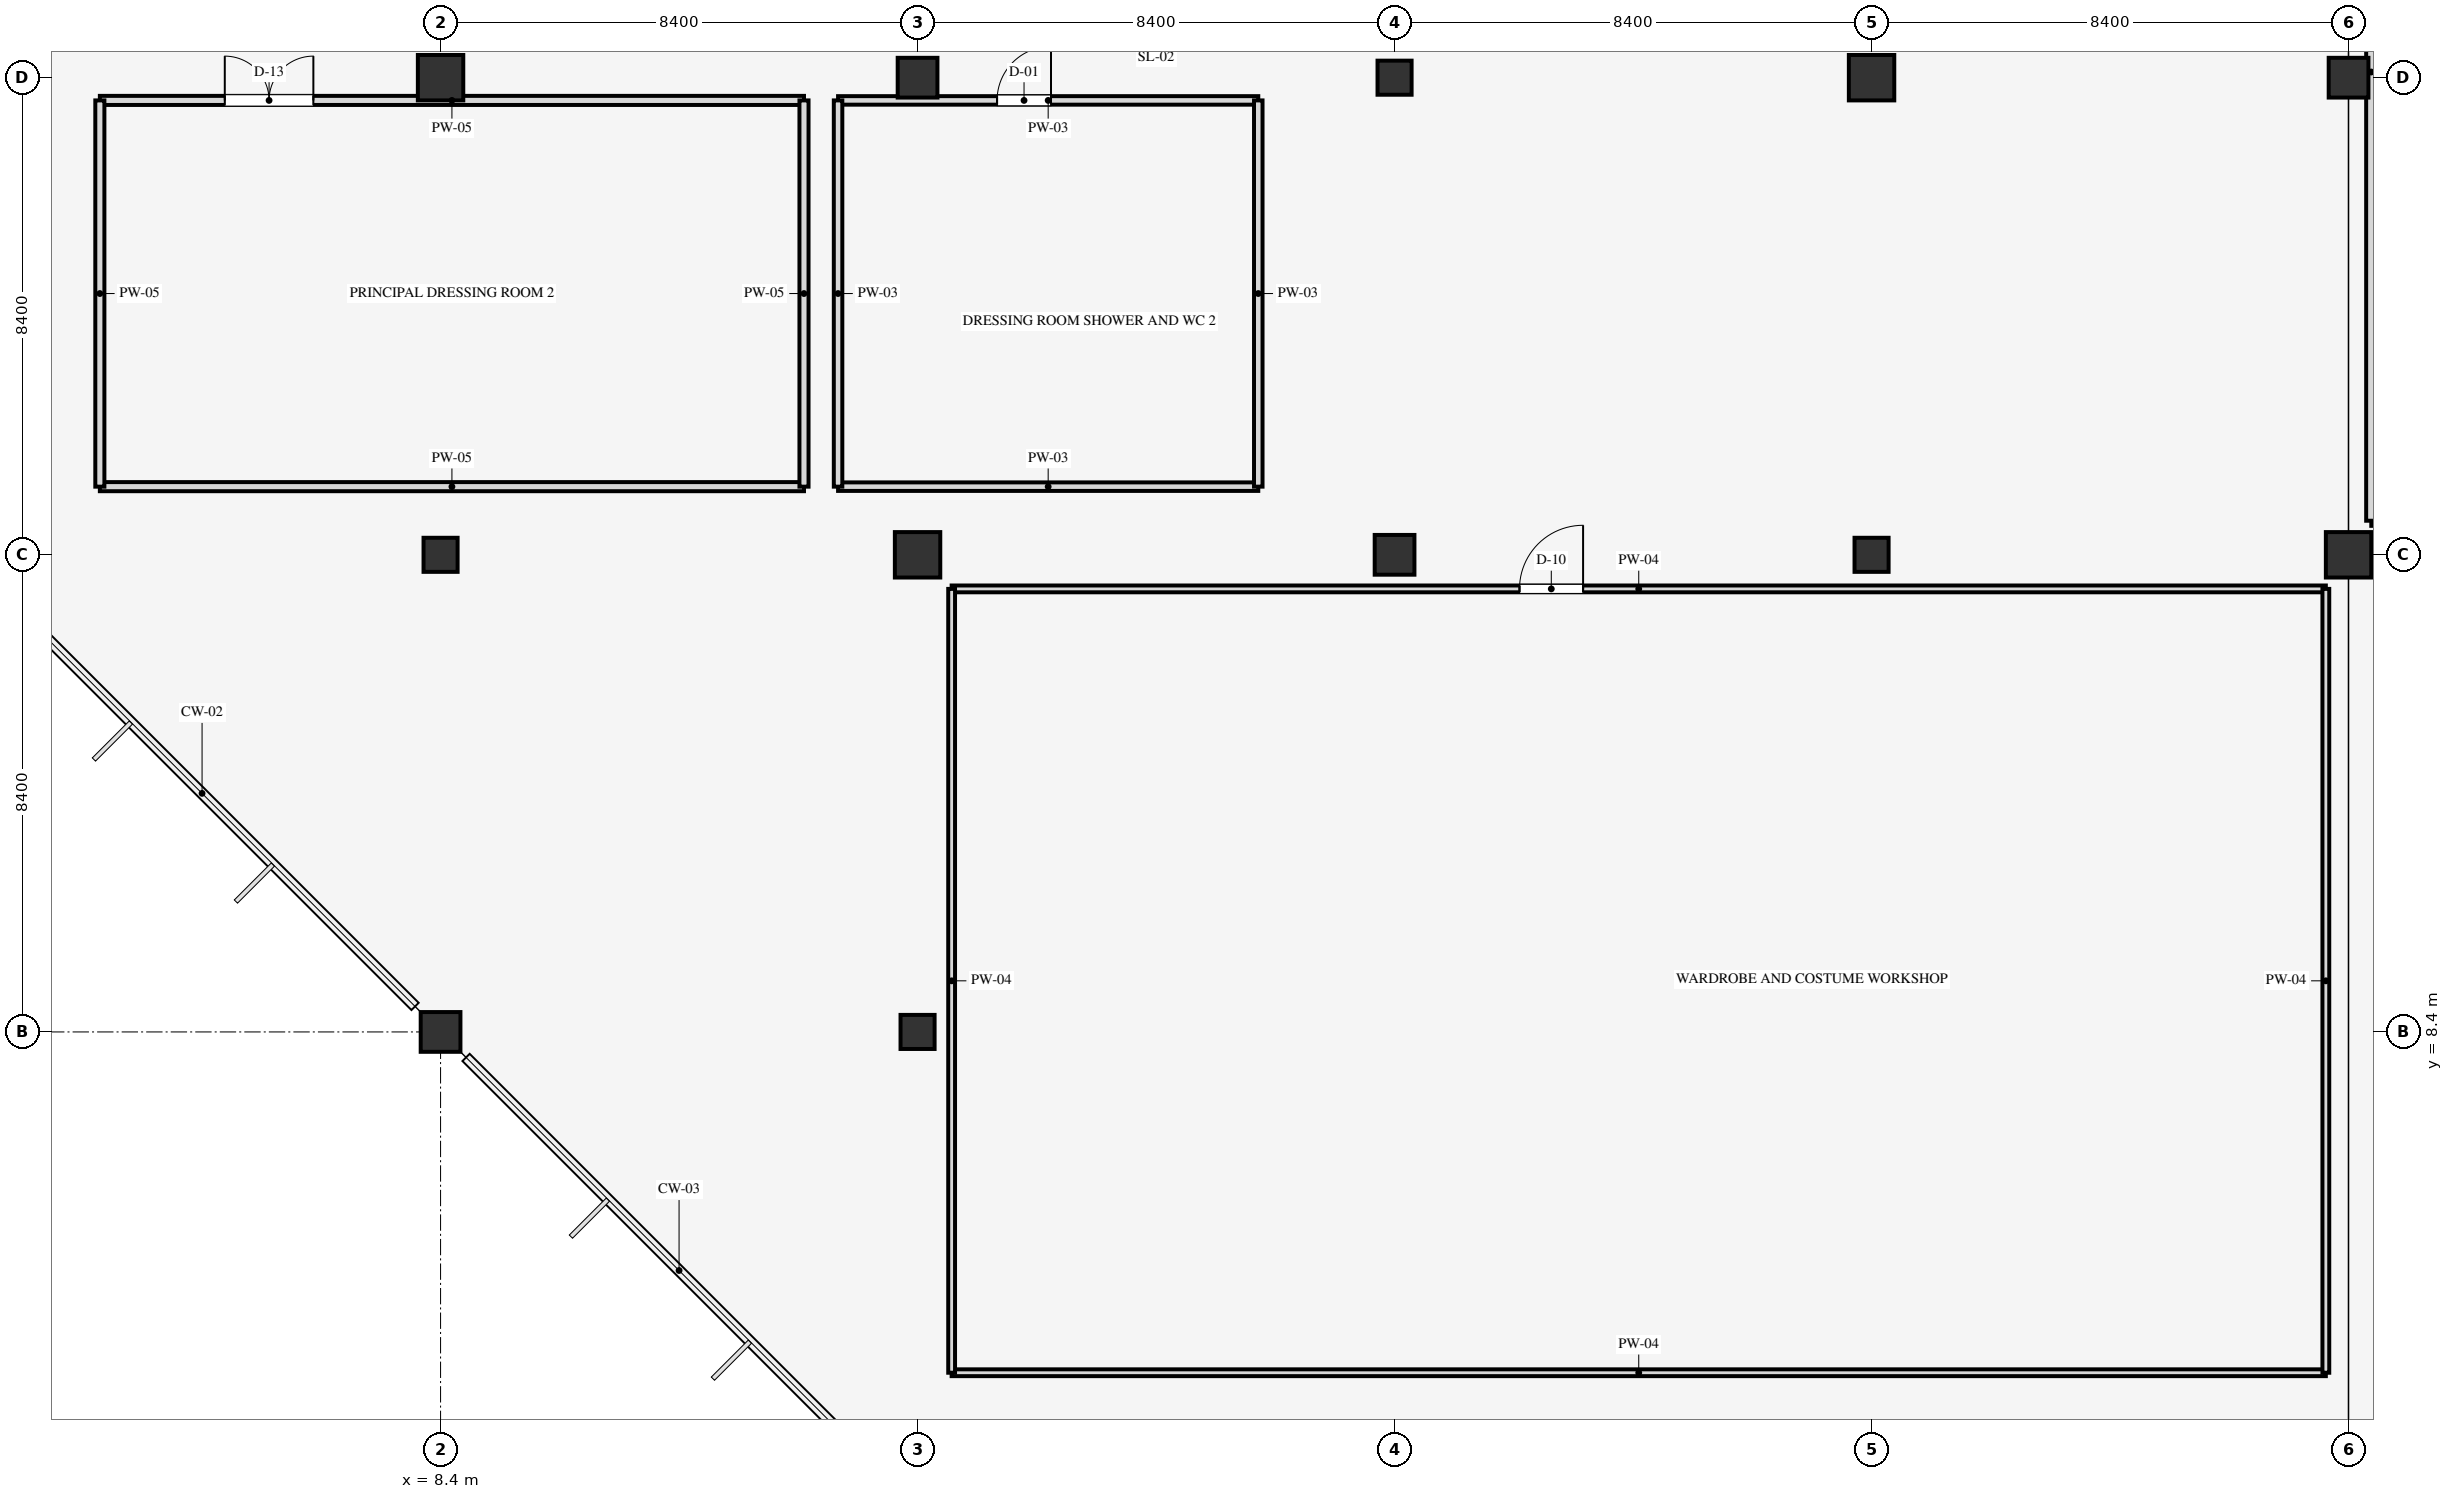
"""IFC4 building model, lengths in metres.
Left out: names, types, materials, properties, quantities, classifications, styles, units other than length and angle.
Written with IfcOpenShell. Run it as: python <this file> out.ifc"""

import sys

from ifc_helpers import new_model, si_unit, direction, frame, frame_2d, origin, origin_2d, place, context, subcontext, project, spatial, rectangle, extrude, element, fill, save


model = new_model("IFC4")
c1 = context("Model", 3, precision=1e-05, world=origin(), true_north=direction((0.0, 1.0)))
c2 = subcontext(c1, "Body", "Model", "MODEL_VIEW")
j1 = project(units=[si_unit("LENGTHUNIT", "METRE"), si_unit("PLANEANGLEUNIT", "RADIAN")], contexts=[c1])
p1 = place(None, origin())
s1 = spatial("IfcSite", under=j1, at=p1, CompositionType="ELEMENT")
p2 = place(p1, origin())
s2 = spatial("IfcBuilding", under=s1, at=p2, CompositionType="ELEMENT")
p3 = place(p2, frame((0.0, 0.0, 5.4)))
s3 = spatial("IfcBuildingStorey", under=s2, at=p3, CompositionType="ELEMENT", Elevation=5.4)
p4 = place(p3, frame((8.4, 8.4, 0.0), z_axis=(0.0, 0.0, 1.0), x_axis=(1.0, 0.0, 0.0)))
e1 = element("IfcColumn", 1, at=p4, inside=s3, PredefinedType="COLUMN", context=c2, shape_type="SweptSolid", body=[
    extrude(rectangle(XDim=0.7, YDim=0.7, at=origin_2d()), origin(), (0.0, 0.0, 1.0), 4.5),
])
p5 = place(p3, frame((8.4, 16.8, 0.0), z_axis=(0.0, 0.0, 1.0), x_axis=(1.0, 0.0, 0.0)))
e2 = element("IfcColumn", 2, at=p5, inside=s3, PredefinedType="COLUMN", context=c2, shape_type="SweptSolid", body=[
    extrude(rectangle(XDim=0.6, YDim=0.6, at=origin_2d()), origin(), (0.0, 0.0, 1.0), 4.5),
])
p6 = place(p3, frame((8.4, 25.2, 0.0), z_axis=(0.0, 0.0, 1.0), x_axis=(1.0, 0.0, 0.0)))
e3 = element("IfcColumn", 3, at=p6, inside=s3, PredefinedType="COLUMN", context=c2, shape_type="SweptSolid", body=[
    extrude(rectangle(XDim=0.8, YDim=0.8, at=origin_2d()), origin(), (0.0, 0.0, 1.0), 4.5),
])
p7 = place(p3, frame((16.8, 8.4, 0.0), z_axis=(0.0, 0.0, 1.0), x_axis=(1.0, 0.0, 0.0)))
e4 = element("IfcColumn", 4, at=p7, inside=s3, PredefinedType="COLUMN", context=c2, shape_type="SweptSolid", body=[
    extrude(rectangle(XDim=0.6, YDim=0.6, at=origin_2d()), origin(), (0.0, 0.0, 1.0), 4.5),
])
p8 = place(p3, frame((16.8, 16.8, 0.0), z_axis=(0.0, 0.0, 1.0), x_axis=(1.0, 0.0, 0.0)))
e5 = element("IfcColumn", 5, at=p8, inside=s3, PredefinedType="COLUMN", context=c2, shape_type="SweptSolid", body=[
    extrude(rectangle(XDim=0.8, YDim=0.8, at=origin_2d()), origin(), (0.0, 0.0, 1.0), 4.5),
])
for number, where, z_axis, x_axis in (
    (6, (16.8, 25.2, 0.0), (0.0, 0.0, 1.0), (1.0, 0.0, 0.0)),
    (7, (25.2, 16.8, 0.0), (0.0, 0.0, 1.0), (1.0, 0.0, 0.0)),
):
    element("IfcColumn", number, at=place(p3, frame(where, z_axis=z_axis, x_axis=x_axis)), inside=s3, PredefinedType="COLUMN", context=c2, shape_type="SweptSolid", body=[
        extrude(rectangle(XDim=0.7, YDim=0.7, at=origin_2d()), origin(), (0.0, 0.0, 1.0), 4.5),
    ])
for number, where, z_axis, x_axis in (
    (8, (25.2, 25.2, 0.0), (0.0, 0.0, 1.0), (1.0, 0.0, 0.0)),
    (9, (33.6, 16.8, 0.0), (0.0, 0.0, 1.0), (1.0, 0.0, 0.0)),
):
    element("IfcColumn", number, at=place(p3, frame(where, z_axis=z_axis, x_axis=x_axis)), inside=s3, PredefinedType="COLUMN", context=c2, shape_type="SweptSolid", body=[
        extrude(rectangle(XDim=0.6, YDim=0.6, at=origin_2d()), origin(), (0.0, 0.0, 1.0), 4.5),
    ])
for number, where, z_axis, x_axis in (
    (10, (33.6, 25.2, 0.0), (0.0, 0.0, 1.0), (1.0, 0.0, 0.0)),
    (11, (42.0, 16.8, 0.0), (0.0, 0.0, 1.0), (1.0, 0.0, 0.0)),
):
    element("IfcColumn", number, at=place(p3, frame(where, z_axis=z_axis, x_axis=x_axis)), inside=s3, PredefinedType="COLUMN", context=c2, shape_type="SweptSolid", body=[
        extrude(rectangle(XDim=0.8, YDim=0.8, at=origin_2d()), origin(), (0.0, 0.0, 1.0), 4.5),
    ])
p9 = place(p3, frame((42.0, 25.2, 0.0), z_axis=(0.0, 0.0, 1.0), x_axis=(1.0, 0.0, 0.0)))
e12 = element("IfcColumn", 12, at=p9, inside=s3, PredefinedType="COLUMN", context=c2, shape_type="SweptSolid", body=[
    extrude(rectangle(XDim=0.7, YDim=0.7, at=origin_2d()), origin(), (0.0, 0.0, 1.0), 4.5),
])
p10 = place(p3, frame((2.4, 18.0, 0.0), z_axis=(0.0, 0.0, 1.0), x_axis=(1.0, 0.0, 0.0)))
e13 = element("IfcWall", 13, at=p10, inside=s3, PredefinedType="PARTITIONING", context=c2, shape_type="SweptSolid", body=[
    extrude(rectangle(XDim=12.4, YDim=0.16, at=frame_2d((6.2, 0.0))), origin(), (0.0, 0.0, 1.0), 3.54),
])
p11 = place(p3, frame((2.4, 24.8, 0.0), z_axis=(0.0, 0.0, 1.0), x_axis=(1.0, 0.0, 0.0)))
e14 = element("IfcWall", 14, at=p11, inside=s3, PredefinedType="PARTITIONING", context=c2, shape_type="SweptSolid", body=[
    extrude(rectangle(XDim=12.4, YDim=0.16, at=frame_2d((6.2, 0.0))), origin(), (0.0, 0.0, 1.0), 3.54),
])
p12 = place(p11, frame((2.2, 0.0, 0.0)))
e15 = element("IfcOpeningElement", 15, at=p12, cuts=e14, PredefinedType="OPENING", context=c2, shape_type="SweptSolid", body=[
    extrude(rectangle(XDim=1.56, YDim=2.2, at=frame_2d((0.78, 1.1))), frame((0.0, 0.09, 0.0), z_axis=(0.0, -1.0, 0.0), x_axis=(1.0, 0.0, 0.0)), (0.0, 0.0, 1.0), 0.18),
])
for number, where, z_axis, x_axis in (
    (16, (2.4, 18.0, 0.0), (0.0, 0.0, 1.0), (0.0, 1.0, 0.0)),
    (17, (14.8, 18.0, 0.0), (0.0, 0.0, 1.0), (0.0, 1.0, 0.0)),
):
    element("IfcWall", number, at=place(p3, frame(where, z_axis=z_axis, x_axis=x_axis)), inside=s3, PredefinedType="PARTITIONING", context=c2, shape_type="SweptSolid", body=[
        extrude(rectangle(XDim=6.8, YDim=0.16, at=frame_2d((3.4, 0.0))), origin(), (0.0, 0.0, 1.0), 3.54),
    ])
p13 = place(p3, frame((15.4, 18.0, 0.0), z_axis=(0.0, 0.0, 1.0), x_axis=(1.0, 0.0, 0.0)))
e18 = element("IfcWall", 18, at=p13, inside=s3, PredefinedType="PARTITIONING", context=c2, shape_type="SweptSolid", body=[
    extrude(rectangle(XDim=7.4, YDim=0.15, at=frame_2d((3.7, 0.0))), origin(), (0.0, 0.0, 1.0), 3.54),
])
p14 = place(p3, frame((15.4, 24.8, 0.0), z_axis=(0.0, 0.0, 1.0), x_axis=(1.0, 0.0, 0.0)))
e19 = element("IfcWall", 19, at=p14, inside=s3, PredefinedType="PARTITIONING", context=c2, shape_type="SweptSolid", body=[
    extrude(rectangle(XDim=7.4, YDim=0.15, at=frame_2d((3.7, 0.0))), origin(), (0.0, 0.0, 1.0), 3.54),
])
p15 = place(p14, frame((2.8, 0.0, 0.0)))
e20 = element("IfcOpeningElement", 20, at=p15, cuts=e19, PredefinedType="OPENING", context=c2, shape_type="SweptSolid", body=[
    extrude(rectangle(XDim=0.95, YDim=2.1, at=frame_2d((0.475, 1.05))), frame((0.0, 0.085, 0.0), z_axis=(0.0, -1.0, 0.0), x_axis=(1.0, 0.0, 0.0)), (0.0, 0.0, 1.0), 0.17),
])
for number, where, z_axis, x_axis in (
    (21, (15.4, 18.0, 0.0), (0.0, 0.0, 1.0), (0.0, 1.0, 0.0)),
    (22, (22.8, 18.0, 0.0), (0.0, 0.0, 1.0), (0.0, 1.0, 0.0)),
):
    element("IfcWall", number, at=place(p3, frame(where, z_axis=z_axis, x_axis=x_axis)), inside=s3, PredefinedType="PARTITIONING", context=c2, shape_type="SweptSolid", body=[
        extrude(rectangle(XDim=6.8, YDim=0.15, at=frame_2d((3.4, 0.0))), origin(), (0.0, 0.0, 1.0), 3.54),
    ])
p16 = place(p3, frame((42.4, 17.4, 0.0), z_axis=(0.0, 0.0, 1.0), x_axis=(1.0, 0.0, 0.0)))
e23 = element("IfcWall", 23, at=p16, inside=s3, PredefinedType="PARTITIONING", context=c2, shape_type="SweptSolid", body=[
    extrude(rectangle(XDim=24.4, YDim=0.18, at=frame_2d((12.2, 0.0))), origin(), (0.0, 0.0, 1.0), 3.54),
])
p17 = place(p3, frame((42.4, 17.4, 0.0), z_axis=(0.0, 0.0, 1.0), x_axis=(0.0, 1.0, 0.0)))
e24 = element("IfcWall", 24, at=p17, inside=s3, PredefinedType="PARTITIONING", context=c2, shape_type="SweptSolid", body=[
    extrude(rectangle(XDim=15.8, YDim=0.18, at=frame_2d((7.9, 0.0))), origin(), (0.0, 0.0, 1.0), 3.54),
])
p18 = place(p3, frame((17.4, 2.4, 0.0), z_axis=(0.0, 0.0, 1.0), x_axis=(1.0, 0.0, 0.0)))
e25 = element("IfcWall", 25, at=p18, inside=s3, PredefinedType="PARTITIONING", context=c2, shape_type="SweptSolid", body=[
    extrude(rectangle(XDim=24.2, YDim=0.12, at=frame_2d((12.1, 0.0))), origin(), (0.0, 0.0, 1.0), 3.54),
])
p19 = place(p3, frame((17.4, 16.2, 0.0), z_axis=(0.0, 0.0, 1.0), x_axis=(1.0, 0.0, 0.0)))
e26 = element("IfcWall", 26, at=p19, inside=s3, PredefinedType="PARTITIONING", context=c2, shape_type="SweptSolid", body=[
    extrude(rectangle(XDim=24.2, YDim=0.12, at=frame_2d((12.1, 0.0))), origin(), (0.0, 0.0, 1.0), 3.54),
])
p20 = place(p19, frame((10.0, 0.0, 0.0)))
e27 = element("IfcOpeningElement", 27, at=p20, cuts=e26, PredefinedType="OPENING", context=c2, shape_type="SweptSolid", body=[
    extrude(rectangle(XDim=1.12, YDim=2.14, at=frame_2d((0.56, 1.07))), frame((0.0, 0.07, 0.0), z_axis=(0.0, -1.0, 0.0), x_axis=(1.0, 0.0, 0.0)), (0.0, 0.0, 1.0), 0.14),
])
for number, where, z_axis, x_axis in (
    (28, (17.4, 2.4, 0.0), (0.0, 0.0, 1.0), (0.0, 1.0, 0.0)),
    (29, (41.6, 2.4, 0.0), (0.0, 0.0, 1.0), (0.0, 1.0, 0.0)),
):
    element("IfcWall", number, at=place(p3, frame(where, z_axis=z_axis, x_axis=x_axis)), inside=s3, PredefinedType="PARTITIONING", context=c2, shape_type="SweptSolid", body=[
        extrude(rectangle(XDim=13.8, YDim=0.12, at=frame_2d((6.9, 0.0))), origin(), (0.0, 0.0, 1.0), 3.54),
    ])
p21 = place(p12, origin())
e30 = element("IfcDoor", 30, at=p21, inside=s3, OperationType="DOUBLE_DOOR_SINGLE_SWING", PredefinedType="DOOR", context=c2, shape_type="SweptSolid", body=[
    extrude(rectangle(XDim=1.56, YDim=2.2, at=frame_2d((0.78, 1.1))), frame((0.0, 0.025, 0.0), z_axis=(0.0, -1.0, 0.0), x_axis=(1.0, 0.0, 0.0)), (0.0, 0.0, 1.0), 0.05),
])
fill(e15, e30)
p22 = place(p15, origin())
e31 = element("IfcDoor", 31, at=p22, inside=s3, OperationType="SINGLE_SWING_RIGHT", PredefinedType="DOOR", context=c2, shape_type="SweptSolid", body=[
    extrude(rectangle(XDim=0.95, YDim=2.1, at=frame_2d((0.475, 1.05))), frame((0.0, 0.025, 0.0), z_axis=(0.0, -1.0, 0.0), x_axis=(1.0, 0.0, 0.0)), (0.0, 0.0, 1.0), 0.05),
])
fill(e20, e31)
p23 = place(p20, origin())
e32 = element("IfcDoor", 32, at=p23, inside=s3, OperationType="SINGLE_SWING_RIGHT", PredefinedType="DOOR", context=c2, shape_type="SweptSolid", body=[
    extrude(rectangle(XDim=1.12, YDim=2.14, at=frame_2d((0.56, 1.07))), frame((0.0, 0.025, 0.0), z_axis=(0.0, -1.0, 0.0), x_axis=(1.0, 0.0, 0.0)), (0.0, 0.0, 1.0), 0.05),
])
fill(e27, e32)
save(model, sys.argv[1])
